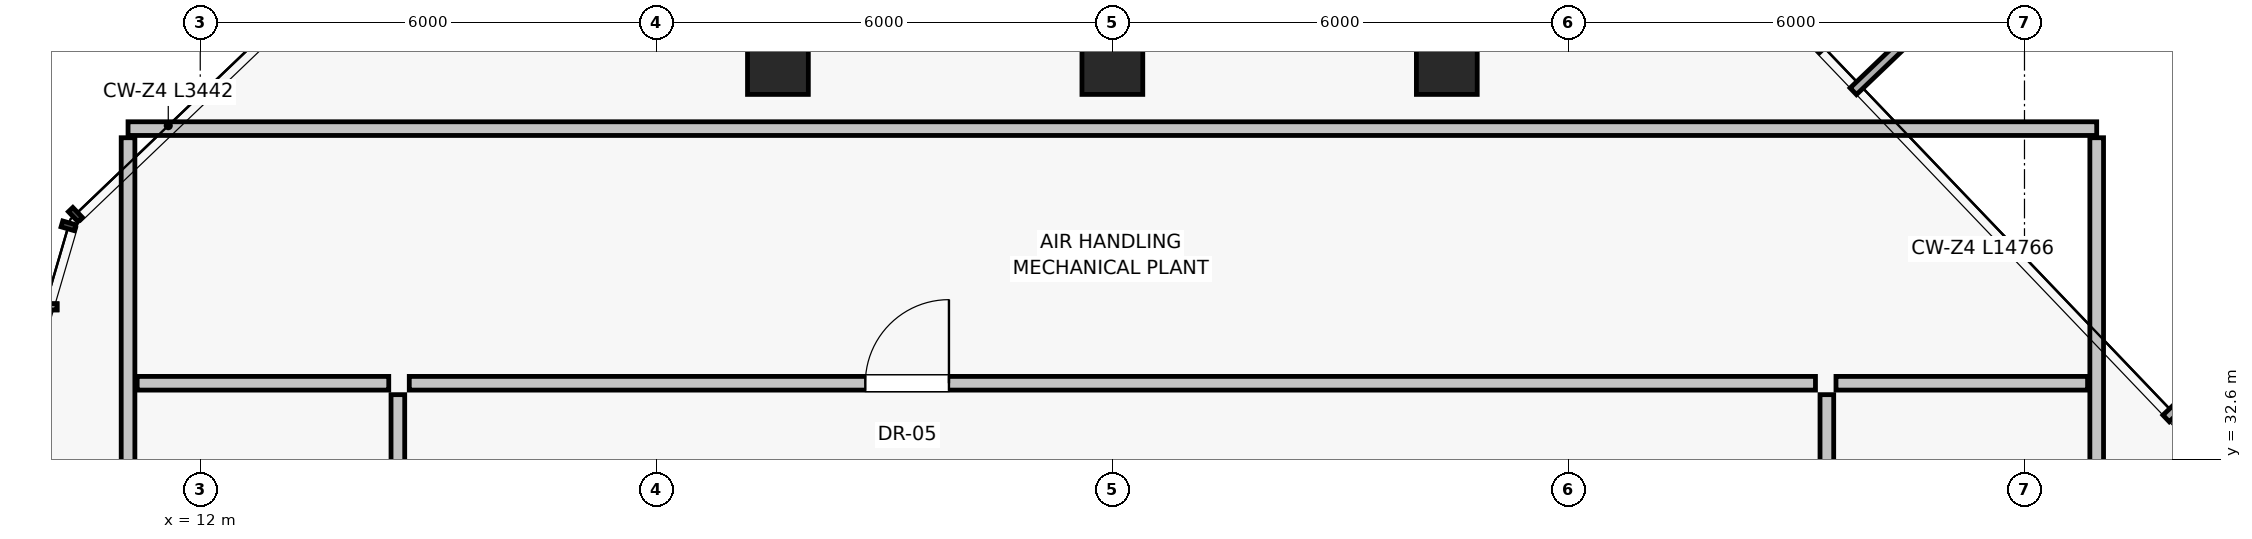
"""IFC4 building model, lengths in metres.
Left out: names, types, materials, properties, quantities, classifications, styles, units other than length and angle.
Written with IfcOpenShell. Run it as: python <this file> out.ifc"""

import sys

from ifc_helpers import new_model, si_unit, direction, frame, frame_2d, origin, origin_2d, place, context, subcontext, project, spatial, rectangle, extrude, source, transform, mapped, element, fill, save


model = new_model("IFC4")
c1 = context("Model", 3, precision=1e-05, world=origin(), true_north=direction((0.0, 1.0)))
c2 = subcontext(c1, "Body", "Model", "MODEL_VIEW")
j1 = project(units=[si_unit("LENGTHUNIT", "METRE"), si_unit("PLANEANGLEUNIT", "RADIAN")], contexts=[c1])
p1 = place(None, origin())
s1 = spatial("IfcSite", under=j1, at=p1, CompositionType="ELEMENT")
p2 = place(p1, origin())
s2 = spatial("IfcBuilding", under=s1, at=p2, CompositionType="ELEMENT")
p3 = place(p2, frame((0.0, 0.0, 264.25)))
s3 = spatial("IfcBuildingStorey", under=s2, at=p3, CompositionType="ELEMENT", Elevation=264.25)
for number, where, z_axis, x_axis in (
    (1, (28.4, 37.8, 0.0), (0.0, 0.0, 1.0), (1.0, 0.0, 0.0)),
    (2, (24.0, 37.8, 0.0), (0.0, 0.0, 1.0), (1.0, 0.0, 0.0)),
    (3, (19.6, 37.8, 0.0), (0.0, 0.0, 1.0), (1.0, 0.0, 0.0)),
):
    element("IfcColumn", number, at=place(p3, frame(where, z_axis=z_axis, x_axis=x_axis)), inside=s3, PredefinedType="COLUMN", context=c2, shape_type="SweptSolid", body=[
        extrude(rectangle(XDim=0.8, YDim=0.8, at=origin_2d()), origin(), (0.0, 0.0, 1.0), 4.65),
    ])
p4 = place(p3, frame((33.4, 14.35, 0.0), z_axis=(0.0, 0.0, 1.0), x_axis=(0.0, 1.0, 0.0)))
e4 = element("IfcWall", 4, at=p4, inside=s3, PredefinedType="PARTITIONING", context=c2, shape_type="SweptSolid", body=[
    extrude(rectangle(XDim=19.1, YDim=0.18, at=frame_2d((9.55, 0.0))), origin(), (0.0, 0.0, 1.0), 4.39),
])
p5 = place(p4, frame((6.0, 0.0, 0.0)))
e5 = element("IfcOpeningElement", 5, at=p5, cuts=e4, PredefinedType="OPENING", context=c2, shape_type="SweptSolid", body=[
    extrude(rectangle(XDim=1.1, YDim=2.03, at=frame_2d((0.55, 1.015))), frame((0.0, 0.1, 0.0), z_axis=(0.0, -1.0, 0.0), x_axis=(1.0, 0.0, 0.0)), (0.0, 0.0, 1.0), 0.2),
])
p6 = place(p3, frame((14.75, 33.6, 0.0), z_axis=(0.0, 0.0, 1.0), x_axis=(1.0, 0.0, 0.0)))
e6 = element("IfcWall", 6, at=p6, inside=s3, PredefinedType="PARTITIONING", context=c2, shape_type="SweptSolid", body=[
    extrude(rectangle(XDim=18.5, YDim=0.18, at=frame_2d((9.25, 0.0))), origin(), (0.0, 0.0, 1.0), 4.39),
])
p7 = place(p6, frame((6.0, 0.0, 0.0)))
e7 = element("IfcOpeningElement", 7, at=p7, cuts=e6, PredefinedType="OPENING", context=c2, shape_type="SweptSolid", body=[
    extrude(rectangle(XDim=1.1, YDim=2.03, at=frame_2d((0.55, 1.015))), frame((0.0, 0.1, 0.0), z_axis=(0.0, -1.0, 0.0), x_axis=(1.0, 0.0, 0.0)), (0.0, 0.0, 1.0), 0.2),
])
p8 = place(p3, frame((14.6, 14.35, 0.0), z_axis=(0.0, 0.0, 1.0), x_axis=(0.0, 1.0, 0.0)))
e8 = element("IfcWall", 8, at=p8, inside=s3, PredefinedType="PARTITIONING", context=c2, shape_type="SweptSolid", body=[
    extrude(rectangle(XDim=19.1, YDim=0.18, at=frame_2d((9.55, 0.0))), origin(), (0.0, 0.0, 1.0), 4.39),
])
p9 = place(p8, frame((6.0, 0.0, 0.0)))
e9 = element("IfcOpeningElement", 9, at=p9, cuts=e8, PredefinedType="OPENING", context=c2, shape_type="SweptSolid", body=[
    extrude(rectangle(XDim=1.1, YDim=2.03, at=frame_2d((0.55, 1.015))), frame((0.0, 0.1, 0.0), z_axis=(0.0, -1.0, 0.0), x_axis=(1.0, 0.0, 0.0)), (0.0, 0.0, 1.0), 0.2),
])
p10 = place(p3, frame((11.05, 36.95, 0.0), z_axis=(0.0, 0.0, 1.0), x_axis=(1.0, 0.0, 0.0)))
e10 = element("IfcWall", 10, at=p10, inside=s3, PredefinedType="PARTITIONING", context=c2, shape_type="SweptSolid", body=[
    extrude(rectangle(XDim=25.9, YDim=0.18, at=frame_2d((12.95, 0.0))), origin(), (0.0, 0.0, 1.0), 2.19),
])
for number, where, z_axis, x_axis in (
    (11, (11.05, 11.17, 0.0), (0.0, 0.0, 1.0), (0.0, 1.0, 0.0)),
    (12, (36.95, 11.17, 0.0), (0.0, 0.0, 1.0), (0.0, 1.0, 0.0)),
):
    element("IfcWall", number, at=place(p3, frame(where, z_axis=z_axis, x_axis=x_axis)), inside=s3, PredefinedType="PARTITIONING", context=c2, shape_type="SweptSolid", body=[
        extrude(rectangle(XDim=25.66, YDim=0.18, at=frame_2d((12.83, 0.0))), origin(), (0.0, 0.0, 1.0), 2.19),
    ])
for number, where, z_axis, x_axis in (
    (13, (11.17, 33.6, 0.0), (0.0, 0.0, 1.0), (1.0, 0.0, 0.0)),
    (14, (33.52, 33.6, 0.0), (0.0, 0.0, 1.0), (1.0, 0.0, 0.0)),
):
    element("IfcWall", number, at=place(p3, frame(where, z_axis=z_axis, x_axis=x_axis)), inside=s3, PredefinedType="PARTITIONING", context=c2, shape_type="SweptSolid", body=[
        extrude(rectangle(XDim=3.31, YDim=0.18, at=frame_2d((1.655, 0.0))), origin(), (0.0, 0.0, 1.0), 4.39),
    ])
m1 = source(origin(), c2, "Body", "SweptSolid", [
    extrude(rectangle(XDim=1.1, YDim=2.03, at=frame_2d((0.55, 1.015))), frame((0.0, 0.025, 0.0), z_axis=(0.0, -1.0, 0.0), x_axis=(1.0, 0.0, 0.0)), (0.0, 0.0, 1.0), 0.05),
])
p11 = place(p7, origin())
e15 = element("IfcDoor", 15, at=p11, inside=s3, OperationType="SINGLE_SWING_RIGHT", PredefinedType="DOOR", context=c2, shape_type="MappedRepresentation", body=[
    mapped(m1, transform((0.0, 0.0, 0.0), scale=1.0)),
])
fill(e7, e15)
save(model, sys.argv[1])
